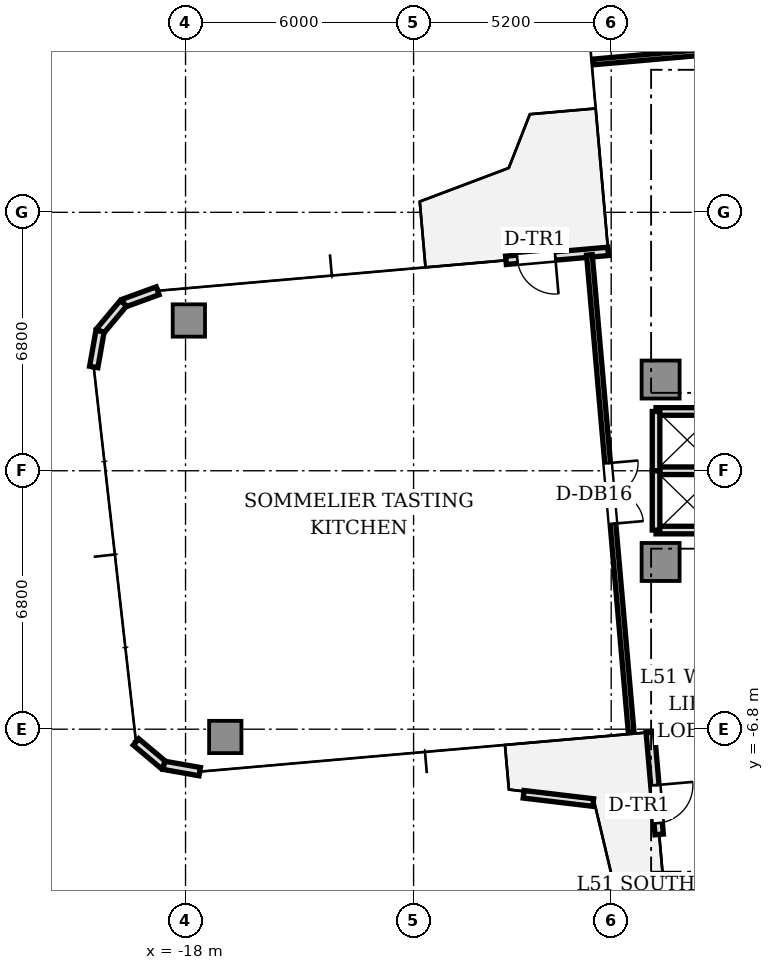
"""IFC4 building model, lengths in metres.
Left out: names, types, materials, properties, quantities, classifications, styles, units other than length and angle.
Written with IfcOpenShell. Run it as: python <this file> out.ifc"""

import sys

from ifc_helpers import new_model, si_unit, direction, frame, frame_2d, origin, origin_2d, place, context, subcontext, project, spatial, rectangle, extrude, source, transform, mapped, element, fill, save


model = new_model("IFC4")
c1 = context("Model", 3, precision=1e-05, world=origin(), true_north=direction((0.0, 1.0)))
c2 = subcontext(c1, "Body", "Model", "MODEL_VIEW")
j1 = project(units=[si_unit("LENGTHUNIT", "METRE"), si_unit("PLANEANGLEUNIT", "RADIAN")], contexts=[c1])
p1 = place(None, origin())
s1 = spatial("IfcSite", under=j1, at=p1, CompositionType="ELEMENT")
p2 = place(p1, origin())
s2 = spatial("IfcBuilding", under=s1, at=p2, CompositionType="ELEMENT")
p3 = place(p2, frame((0.0, 0.0, 185.25)))
s3 = spatial("IfcBuildingStorey", under=s2, at=p3, CompositionType="ELEMENT", Elevation=185.25)
m1 = source(origin(), c2, "Body", "SweptSolid", [
    extrude(rectangle(XDim=1.0, YDim=1.0, at=origin_2d()), origin(), (0.0, 0.0, 1.0), 3.11),
])
for number, where, z_axis, x_axis in (
    (1, (-5.5, 2.4, 0.0), (0.0, 0.0, 1.0), (1.0, 0.0, 0.0)),
    (2, (-5.5, -2.4, 0.0), (0.0, 0.0, 1.0), (1.0, 0.0, 0.0)),
):
    element("IfcColumn", number, at=place(p3, frame(where, z_axis=z_axis, x_axis=x_axis)), inside=s3, PredefinedType="COLUMN", context=c2, shape_type="MappedRepresentation", body=[
        mapped(m1, transform((0.0, 0.0, 0.0), scale=1.0)),
    ])
m2 = source(origin(), c2, "Body", "SweptSolid", [
    extrude(rectangle(XDim=0.85, YDim=0.85, at=origin_2d()), origin(), (0.0, 0.0, 1.0), 3.11),
])
for number, where, z_axis, x_axis in (
    (3, (-17.913, 3.954, 0.0), (0.0, 0.0, 1.0), (1.0, 0.0, 0.0)),
    (4, (-16.954, -7.004, 0.0), (0.0, 0.0, 1.0), (1.0, 0.0, 0.0)),
):
    element("IfcColumn", number, at=place(p3, frame(where, z_axis=z_axis, x_axis=x_axis)), inside=s3, PredefinedType="COLUMN", context=c2, shape_type="MappedRepresentation", body=[
        mapped(m2, transform((0.0, 0.0, 0.0), scale=1.0)),
    ])
p4 = place(p3, frame((-6.879, 5.772, 0.0), z_axis=(0.0, 0.0, 1.0), x_axis=(-0.996193619346, -0.087168071984, 0.0)))
e5 = element("IfcWall", 5, at=p4, inside=s3, PredefinedType="STANDARD", context=c2, shape_type="SweptSolid", body=[
    extrude(rectangle(XDim=2.7, YDim=0.22, at=frame_2d((1.35, 0.0))), origin(), (0.0, 0.0, 1.0), 3.11),
])
p5 = place(p4, frame((1.4, 0.0, 0.0)))
e6 = element("IfcOpeningElement", 6, at=p5, cuts=e5, PredefinedType="OPENING", context=c2, shape_type="SweptSolid", body=[
    extrude(rectangle(XDim=1.0, YDim=2.2, at=frame_2d((0.5, 1.1))), frame((0.0, 0.12, 0.0), z_axis=(0.0, -1.0, 0.0), x_axis=(1.0, 0.0, 0.0)), (0.0, 0.0, 1.0), 0.24),
])
p6 = place(p3, frame((-18.734, 4.735, 0.0), z_axis=(0.0, 0.0, 1.0), x_axis=(-0.939741306239, -0.34188635151, 0.0)))
e7 = element("IfcWall", 7, at=p6, inside=s3, PredefinedType="STANDARD", context=c2, shape_type="SweptSolid", body=[
    extrude(rectangle(XDim=0.958, YDim=0.22, at=frame_2d((0.479, 0.0))), origin(), (0.0, 0.0, 1.0), 3.11),
])
for number, where, z_axis, x_axis in (
    (8, (-19.634, 4.408, 0.0), (0.0, 0.0, 1.0), (-0.643, -0.766, 0.0)),
    (9, (-20.25, 3.674, 0.0), (0.0, 0.0, 1.0), (-0.174, -0.985, 0.0)),
):
    element("IfcWall", number, at=place(p3, frame(where, z_axis=z_axis, x_axis=x_axis)), inside=s3, PredefinedType="STANDARD", context=c2, shape_type="SweptSolid", body=[
        extrude(rectangle(XDim=0.958, YDim=0.22, at=frame_2d((0.479, 0.0))), origin(), (0.0, 0.0, 1.0), 3.11),
    ])
p7 = place(p3, frame((-19.304, -7.135, 0.0), z_axis=(0.0, 0.0, 1.0), x_axis=(0.766001159887, -0.642839189107, 0.0)))
e10 = element("IfcWall", 10, at=p7, inside=s3, PredefinedType="STANDARD", context=c2, shape_type="SweptSolid", body=[
    extrude(rectangle(XDim=0.958, YDim=0.22, at=frame_2d((0.479, 0.0))), origin(), (0.0, 0.0, 1.0), 3.11),
])
p8 = place(p3, frame((-18.57, -7.75, 0.0), z_axis=(0.0, 0.0, 1.0), x_axis=(0.984770724397, -0.173858046606, 0.0)))
e11 = element("IfcWall", 11, at=p8, inside=s3, PredefinedType="STANDARD", context=c2, shape_type="SweptSolid", body=[
    extrude(rectangle(XDim=0.958, YDim=0.22, at=frame_2d((0.479, 0.0))), origin(), (0.0, 0.0, 1.0), 3.11),
])
p9 = place(p3, frame((-5.772, -6.879, 0.0), z_axis=(0.0, 0.0, 1.0), x_axis=(0.087168071984, -0.996193619346, 0.0)))
e12 = element("IfcWall", 12, at=p9, inside=s3, PredefinedType="STANDARD", context=c2, shape_type="SweptSolid", body=[
    extrude(rectangle(XDim=2.7, YDim=0.22, at=frame_2d((1.35, 0.0))), origin(), (0.0, 0.0, 1.0), 3.11),
])
p10 = place(p9, frame((1.4, 0.0, 0.0)))
e13 = element("IfcOpeningElement", 13, at=p10, cuts=e12, PredefinedType="OPENING", context=c2, shape_type="SweptSolid", body=[
    extrude(rectangle(XDim=1.0, YDim=2.2, at=frame_2d((0.5, 1.1))), frame((0.0, 0.12, 0.0), z_axis=(0.0, -1.0, 0.0), x_axis=(1.0, 0.0, 0.0)), (0.0, 0.0, 1.0), 0.24),
])
p11 = place(p3, frame((-9.104, -8.512, 0.0), z_axis=(0.0, 0.0, 1.0), x_axis=(0.993023408226, -0.117917389369, 0.0)))
e14 = element("IfcWall", 14, at=p11, inside=s3, PredefinedType="PARAPET", context=c2, shape_type="SweptSolid", body=[
    extrude(rectangle(XDim=1.843, YDim=0.2, at=frame_2d((0.921, 0.0))), origin(), (0.0, 0.0, 1.0), 0.65),
])
for number, where, z_axis, x_axis in (
    (15, (-5.62, 1.56, 0.0), (0.0, 0.0, 1.0), (1.0, 0.0, 0.0)),
    (16, (-5.62, -1.56, 0.0), (0.0, 0.0, 1.0), (1.0, 0.0, 0.0)),
    (17, (-5.62, 0.0, 0.0), (0.0, 0.0, 1.0), (1.0, 0.0, 0.0)),
):
    element("IfcWall", number, at=place(p3, frame(where, z_axis=z_axis, x_axis=x_axis)), inside=s3, PredefinedType="SOLIDWALL", context=c2, shape_type="SweptSolid", body=[
        extrude(rectangle(XDim=1.64, YDim=0.2, at=frame_2d((0.82, 0.0))), origin(), (0.0, 0.0, 1.0), 2.66),
    ])
for number, where, z_axis, x_axis in (
    (18, (-5.62, 0.0, 0.0), (0.0, 0.0, 1.0), (0.0, 1.0, 0.0)),
    (19, (-5.62, -1.56, 0.0), (0.0, 0.0, 1.0), (0.0, 1.0, 0.0)),
):
    element("IfcWall", number, at=place(p3, frame(where, z_axis=z_axis, x_axis=x_axis)), inside=s3, PredefinedType="SOLIDWALL", context=c2, shape_type="SweptSolid", body=[
        extrude(rectangle(XDim=1.56, YDim=0.2, at=frame_2d((0.78, 0.0))), origin(), (0.0, 0.0, 1.0), 2.66),
    ])
p12 = place(p3, frame((5.287, 11.856, 0.0), z_axis=(0.0, 0.0, 1.0), x_axis=(-0.996194790044, -0.087154691724, 0.0)))
e20 = element("IfcWall", 20, at=p12, inside=s3, PredefinedType="PARTITIONING", context=c2, shape_type="SweptSolid", body=[
    extrude(rectangle(XDim=12.6, YDim=0.15, at=frame_2d((6.3, 0.0))), origin(), (0.0, 0.0, 1.0), 2.66),
])
p13 = place(p12, frame((5.5, 0.0, 0.0)))
e21 = element("IfcOpeningElement", 21, at=p13, cuts=e20, PredefinedType="OPENING", context=c2, shape_type="SweptSolid", body=[
    extrude(rectangle(XDim=1.6, YDim=2.25, at=frame_2d((0.8, 1.125))), frame((0.0, 0.085, 0.0), z_axis=(0.0, -1.0, 0.0), x_axis=(1.0, 0.0, 0.0)), (0.0, 0.0, 1.0), 0.17),
])
p14 = place(p3, frame((-7.373, 5.679, 0.0), z_axis=(0.0, 0.0, 1.0), x_axis=(0.087154691724, -0.996194790044, 0.0)))
e22 = element("IfcWall", 22, at=p14, inside=s3, PredefinedType="PARTITIONING", context=c2, shape_type="SweptSolid", body=[
    extrude(rectangle(XDim=12.6, YDim=0.15, at=frame_2d((6.3, 0.0))), origin(), (0.0, 0.0, 1.0), 2.66),
])
p15 = place(p14, frame((5.5, 0.0, 0.0)))
e23 = element("IfcOpeningElement", 23, at=p15, cuts=e22, PredefinedType="OPENING", context=c2, shape_type="SweptSolid", body=[
    extrude(rectangle(XDim=1.6, YDim=2.25, at=frame_2d((0.8, 1.125))), frame((0.0, 0.085, 0.0), z_axis=(0.0, -1.0, 0.0), x_axis=(1.0, 0.0, 0.0)), (0.0, 0.0, 1.0), 0.17),
])
m3 = source(origin(), c2, "Body", "SweptSolid", [
    extrude(rectangle(XDim=1.0, YDim=0.05, at=origin_2d()), origin(), (0.0, 0.0, 1.0), 2.2),
])
p16 = place(p5, frame((0.5, 0.0, 0.0)))
e24 = element("IfcDoor", 24, at=p16, inside=s3, OperationType="SINGLE_SWING_LEFT", PredefinedType="DOOR", context=c2, shape_type="MappedRepresentation", body=[
    mapped(m3, transform((0.0, 0.0, 0.0), scale=1.0)),
])
fill(e6, e24)
p17 = place(p10, frame((0.5, 0.0, 0.0)))
e25 = element("IfcDoor", 25, at=p17, inside=s3, OperationType="SINGLE_SWING_LEFT", PredefinedType="DOOR", context=c2, shape_type="MappedRepresentation", body=[
    mapped(m3, transform((0.0, 0.0, 0.0), scale=1.0)),
])
fill(e13, e25)
m4 = source(origin(), c2, "Body", "SweptSolid", [
    extrude(rectangle(XDim=1.6, YDim=0.05, at=origin_2d()), origin(), (0.0, 0.0, 1.0), 2.25),
])
p18 = place(p15, frame((0.8, 0.0, 0.0)))
e26 = element("IfcDoor", 26, at=p18, inside=s3, OperationType="DOUBLE_DOOR_SINGLE_SWING", PredefinedType="DOOR", context=c2, shape_type="MappedRepresentation", body=[
    mapped(m4, transform((0.0, 0.0, 0.0), scale=1.0)),
])
fill(e23, e26)
save(model, sys.argv[1])
